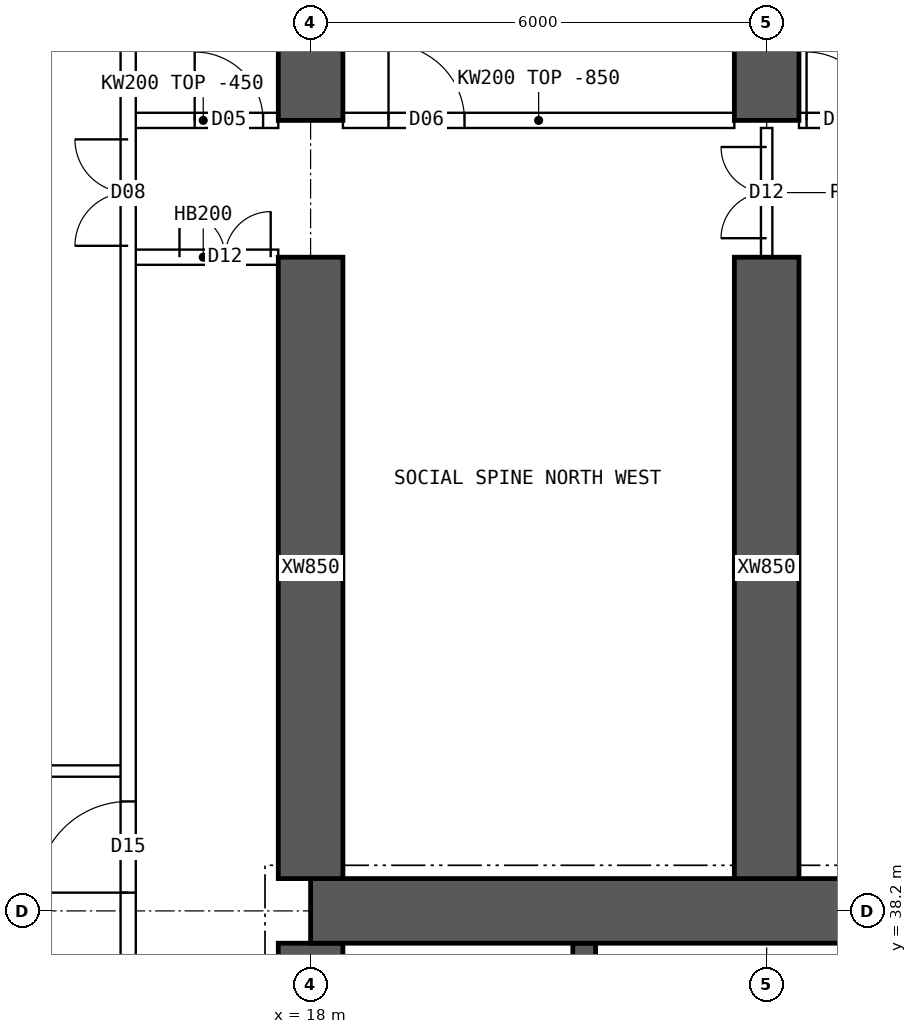
"""IFC4 building model, lengths in metres.
Left out: names, types, materials, properties, quantities, classifications, styles, units other than length and angle.
Written with IfcOpenShell. Run it as: python <this file> out.ifc"""

import sys

from ifc_helpers import new_model, si_unit, direction, frame, frame_2d, origin, place, context, subcontext, project, spatial, polyline, rectangle, outline, extrude, element, fill, save


model = new_model("IFC4")
c1 = context("Model", 3, precision=1e-05, world=origin(), true_north=direction((0.0, 1.0)))
c2 = subcontext(c1, "Body", "Model", "MODEL_VIEW")
j1 = project(units=[si_unit("LENGTHUNIT", "METRE"), si_unit("PLANEANGLEUNIT", "RADIAN")], contexts=[c1])
p1 = place(None, origin())
s1 = spatial("IfcSite", under=j1, at=p1, CompositionType="ELEMENT")
p2 = place(p1, origin())
s2 = spatial("IfcBuilding", under=s1, at=p2, CompositionType="ELEMENT")
p3 = place(p2, frame((0.0, 0.0, 159.85)))
s3 = spatial("IfcBuildingStorey", under=s2, at=p3, CompositionType="ELEMENT", Elevation=159.85)
p4 = place(p3, frame((18.0, 38.2, 0.0), z_axis=(0.0, 0.0, 1.0), x_axis=(1.0, 0.0, 0.0)))
e1 = element("IfcWall", 1, at=p4, inside=s3, PredefinedType="SHEAR", context=c2, shape_type="SweptSolid", body=[
    extrude(rectangle(XDim=48.0, YDim=0.85, at=frame_2d((24.0, 0.0))), origin(), (0.0, 0.0, 1.0), 3.75),
])
p5 = place(p3, frame((18.0, 26.225, 0.0), z_axis=(0.0, 0.0, 1.0), x_axis=(0.0, 1.0, 0.0)))
e2 = element("IfcWall", 2, at=p5, inside=s3, PredefinedType="SHEAR", context=c2, shape_type="SweptSolid", body=[
    extrude(rectangle(XDim=11.55, YDim=0.85, at=frame_2d((5.775, 0.0))), origin(), (0.0, 0.0, 1.0), 3.75),
])
p6 = place(p5, frame((5.075, 0.0, 0.0)))
e3 = element("IfcOpeningElement", 3, at=p6, cuts=e2, PredefinedType="OPENING", context=c2, shape_type="SweptSolid", body=[
    extrude(rectangle(XDim=1.2, YDim=2.1, at=frame_2d((0.6, 1.05))), frame((0.0, 0.435, 0.0), z_axis=(0.0, -1.0, 0.0), x_axis=(1.0, 0.0, 0.0)), (0.0, 0.0, 1.0), 0.87),
])
p7 = place(p3, frame((21.6, 34.75, 0.0), z_axis=(0.0, 0.0, 1.0), x_axis=(0.0, 1.0, 0.0)))
e4 = element("IfcWall", 4, at=p7, inside=s3, PredefinedType="SHEAR", context=c2, shape_type="SweptSolid", body=[
    extrude(rectangle(XDim=3.025, YDim=0.3, at=frame_2d((1.512, 0.0))), origin(), (0.0, 0.0, 1.0), 3.75),
])
p8 = place(p3, frame((18.0, 48.6, 0.0), z_axis=(0.0, 0.0, 1.0), x_axis=(0.0, 1.0, 0.0)))
e5 = element("IfcWall", 5, at=p8, inside=s3, PredefinedType="SHEAR", context=c2, shape_type="SweptSolid", body=[
    extrude(rectangle(XDim=5.4, YDim=0.85, at=frame_2d((2.7, 0.0))), origin(), (0.0, 0.0, 1.0), 3.75),
])
p9 = place(p3, frame((18.0, 38.625, 0.0), z_axis=(0.0, 0.0, 1.0), x_axis=(0.0, 1.0, 0.0)))
e6 = element("IfcWall", 6, at=p9, inside=s3, PredefinedType="SHEAR", context=c2, shape_type="SweptSolid", body=[
    extrude(rectangle(XDim=8.175, YDim=0.85, at=frame_2d((4.087, 0.0))), origin(), (0.0, 0.0, 1.0), 3.75),
])
p10 = place(p3, frame((24.0, 48.6, 0.0), z_axis=(0.0, 0.0, 1.0), x_axis=(0.0, 1.0, 0.0)))
e7 = element("IfcWall", 7, at=p10, inside=s3, PredefinedType="SHEAR", context=c2, shape_type="SweptSolid", body=[
    extrude(rectangle(XDim=5.4, YDim=0.85, at=frame_2d((2.7, 0.0))), origin(), (0.0, 0.0, 1.0), 3.75),
])
p11 = place(p3, frame((24.0, 38.625, 0.0), z_axis=(0.0, 0.0, 1.0), x_axis=(0.0, 1.0, 0.0)))
e8 = element("IfcWall", 8, at=p11, inside=s3, PredefinedType="SHEAR", context=c2, shape_type="SweptSolid", body=[
    extrude(rectangle(XDim=8.175, YDim=0.85, at=frame_2d((4.087, 0.0))), origin(), (0.0, 0.0, 1.0), 3.75),
])
p12 = place(p3, frame((15.6, 48.6, 0.0), z_axis=(0.0, 0.0, 1.0), x_axis=(1.0, 0.0, 0.0)))
e9 = element("IfcWall", 9, at=p12, inside=s3, PredefinedType="SOLIDWALL", context=c2, shape_type="SweptSolid", body=[
    extrude(rectangle(XDim=1.975, YDim=0.2, at=frame_2d((0.987, 0.0))), origin(), (0.0, 0.0, 1.0), 3.3),
])
p13 = place(p12, frame((0.875, 0.0, 0.0)))
e10 = element("IfcOpeningElement", 10, at=p13, cuts=e9, PredefinedType="OPENING", context=c2, shape_type="SweptSolid", body=[
    extrude(rectangle(XDim=0.9, YDim=2.1, at=frame_2d((0.45, 1.05))), frame((0.0, 0.11, 0.0), z_axis=(0.0, -1.0, 0.0), x_axis=(1.0, 0.0, 0.0)), (0.0, 0.0, 1.0), 0.22),
])
p14 = place(p3, frame((15.6, 46.8, 0.0), z_axis=(0.0, 0.0, 1.0), x_axis=(1.0, 0.0, 0.0)))
e11 = element("IfcWall", 11, at=p14, inside=s3, PredefinedType="SOLIDWALL", context=c2, shape_type="SweptSolid", body=[
    extrude(rectangle(XDim=1.975, YDim=0.2, at=frame_2d((0.987, 0.0))), origin(), (0.0, 0.0, 1.0), 3.3),
])
p15 = place(p14, frame((0.675, 0.0, 0.0)))
e12 = element("IfcOpeningElement", 12, at=p15, cuts=e11, PredefinedType="OPENING", context=c2, shape_type="SweptSolid", body=[
    extrude(rectangle(XDim=1.2, YDim=2.1, at=frame_2d((0.6, 1.05))), frame((0.0, 0.11, 0.0), z_axis=(0.0, -1.0, 0.0), x_axis=(1.0, 0.0, 0.0)), (0.0, 0.0, 1.0), 0.22),
])
p16 = place(p3, frame((18.425, 48.6, 0.0), z_axis=(0.0, 0.0, 1.0), x_axis=(1.0, 0.0, 0.0)))
e13 = element("IfcWall", 13, at=p16, inside=s3, PredefinedType="SOLIDWALL", context=c2, shape_type="SweptSolid", body=[
    extrude(outline(polyline([(0.0, 0.0), (5.15, 0.0), (5.15, 2.9), (0.0, 2.9), (0.0, 0.0)])), frame((0.0, 0.1, 0.0), z_axis=(0.0, -1.0, 0.0), x_axis=(1.0, 0.0, 0.0)), (0.0, 0.0, 1.0), 0.2),
])
p17 = place(p16, frame((0.6, 0.0, 0.0)))
e14 = element("IfcOpeningElement", 14, at=p17, cuts=e13, PredefinedType="OPENING", context=c2, shape_type="SweptSolid", body=[
    extrude(rectangle(XDim=1.0, YDim=2.1, at=frame_2d((0.5, 1.05))), frame((0.0, 0.11, 0.0), z_axis=(0.0, -1.0, 0.0), x_axis=(1.0, 0.0, 0.0)), (0.0, 0.0, 1.0), 0.22),
])
p18 = place(p3, frame((24.425, 48.6, 0.0), z_axis=(0.0, 0.0, 1.0), x_axis=(1.0, 0.0, 0.0)))
e15 = element("IfcWall", 15, at=p18, inside=s3, PredefinedType="SOLIDWALL", context=c2, shape_type="SweptSolid", body=[
    extrude(outline(polyline([(0.0, 0.0), (5.15, 0.0), (5.15, 2.9), (0.0, 2.9), (0.0, 0.0)])), frame((0.0, 0.1, 0.0), z_axis=(0.0, -1.0, 0.0), x_axis=(1.0, 0.0, 0.0)), (0.0, 0.0, 1.0), 0.2),
])
p19 = place(p18, frame((0.1, 0.0, 0.0)))
e16 = element("IfcOpeningElement", 16, at=p19, cuts=e15, PredefinedType="OPENING", context=c2, shape_type="SweptSolid", body=[
    extrude(rectangle(XDim=0.9, YDim=2.1, at=frame_2d((0.45, 1.05))), frame((0.0, 0.11, 0.0), z_axis=(0.0, -1.0, 0.0), x_axis=(1.0, 0.0, 0.0)), (0.0, 0.0, 1.0), 0.22),
])
p20 = place(p3, frame((24.0, 46.8, 0.0), z_axis=(0.0, 0.0, 1.0), x_axis=(0.0, 1.0, 0.0)))
e17 = element("IfcWall", 17, at=p20, inside=s3, PredefinedType="PARTITIONING", context=c2, shape_type="SweptSolid", body=[
    extrude(outline(polyline([(0.0, 0.0), (1.7, 0.0), (1.7, 2.9), (0.0, 2.9), (0.0, 0.0)])), frame((0.0, 0.075, 0.0), z_axis=(0.0, -1.0, 0.0), x_axis=(1.0, 0.0, 0.0)), (0.0, 0.0, 1.0), 0.15),
])
p21 = place(p20, frame((0.25, 0.0, 0.0)))
e18 = element("IfcOpeningElement", 18, at=p21, cuts=e17, PredefinedType="OPENING", context=c2, shape_type="SweptSolid", body=[
    extrude(rectangle(XDim=1.2, YDim=2.1, at=frame_2d((0.6, 1.05))), frame((0.0, 0.085, 0.0), z_axis=(0.0, -1.0, 0.0), x_axis=(1.0, 0.0, 0.0)), (0.0, 0.0, 1.0), 0.17),
])
p22 = place(p3, frame((15.6, 10.446, 0.0), z_axis=(0.0, 0.0, 1.0), x_axis=(0.0, 1.0, 0.0)))
e19 = element("IfcWall", 19, at=p22, inside=s3, PredefinedType="SOLIDWALL", context=c2, shape_type="SweptSolid", body=[
    extrude(rectangle(XDim=43.107, YDim=0.2, at=frame_2d((21.554, 0.0))), origin(), (0.0, 0.0, 1.0), 3.3),
])
p23 = place(p22, frame((13.914, 0.0, 0.0)))
e20 = element("IfcOpeningElement", 20, at=p23, cuts=e19, PredefinedType="OPENING", context=c2, shape_type="SweptSolid", body=[
    extrude(rectangle(XDim=1.2, YDim=2.1, at=frame_2d((0.6, 1.05))), frame((0.0, 0.11, 0.0), z_axis=(0.0, -1.0, 0.0), x_axis=(1.0, 0.0, 0.0)), (0.0, 0.0, 1.0), 0.22),
])
p24 = place(p22, frame((27.994, 0.0, 0.0)))
e21 = element("IfcOpeningElement", 21, at=p24, cuts=e19, PredefinedType="OPENING", context=c2, shape_type="SweptSolid", body=[
    extrude(rectangle(XDim=1.2, YDim=2.1, at=frame_2d((0.6, 1.05))), frame((0.0, 0.11, 0.0), z_axis=(0.0, -1.0, 0.0), x_axis=(1.0, 0.0, 0.0)), (0.0, 0.0, 1.0), 0.22),
])
p25 = place(p22, frame((5.104, 0.0, 0.0)))
e22 = element("IfcOpeningElement", 22, at=p25, cuts=e19, PredefinedType="OPENING", context=c2, shape_type="SweptSolid", body=[
    extrude(rectangle(XDim=1.4, YDim=2.1, at=frame_2d((0.7, 1.05))), frame((0.0, 0.11, 0.0), z_axis=(0.0, -1.0, 0.0), x_axis=(1.0, 0.0, 0.0)), (0.0, 0.0, 1.0), 0.22),
])
p26 = place(p22, frame((36.504, 0.0, 0.0)))
e23 = element("IfcOpeningElement", 23, at=p26, cuts=e19, PredefinedType="OPENING", context=c2, shape_type="SweptSolid", body=[
    extrude(rectangle(XDim=1.4, YDim=2.1, at=frame_2d((0.7, 1.05))), frame((0.0, 0.11, 0.0), z_axis=(0.0, -1.0, 0.0), x_axis=(1.0, 0.0, 0.0)), (0.0, 0.0, 1.0), 0.22),
])
p27 = place(p3, frame((8.705, 40.04, 0.0), z_axis=(0.0, 0.0, 1.0), x_axis=(1.0, 0.0, 0.0)))
e24 = element("IfcWall", 24, at=p27, inside=s3, PredefinedType="PARTITIONING", context=c2, shape_type="SweptSolid", body=[
    extrude(rectangle(XDim=6.82, YDim=0.15, at=frame_2d((3.41, 0.0))), origin(), (0.0, 0.0, 1.0), 3.3),
])
p28 = place(p15, origin())
e25 = element("IfcDoor", 25, at=p28, inside=s3, OperationType="DOUBLE_DOOR_SINGLE_SWING", PredefinedType="DOOR", context=c2, shape_type="SweptSolid", body=[
    extrude(rectangle(XDim=1.2, YDim=2.1, at=frame_2d((0.6, 1.05))), frame((0.0, 0.025, 0.0), z_axis=(0.0, -1.0, 0.0), x_axis=(1.0, 0.0, 0.0)), (0.0, 0.0, 1.0), 0.05),
])
fill(e12, e25)
p29 = place(p17, origin())
e26 = element("IfcDoor", 26, at=p29, inside=s3, OperationType="SINGLE_SWING_LEFT", PredefinedType="DOOR", context=c2, shape_type="SweptSolid", body=[
    extrude(rectangle(XDim=1.0, YDim=2.1, at=frame_2d((0.5, 1.05))), frame((0.0, 0.025, 0.0), z_axis=(0.0, -1.0, 0.0), x_axis=(1.0, 0.0, 0.0)), (0.0, 0.0, 1.0), 0.05),
])
fill(e14, e26)
p30 = place(p19, origin())
e27 = element("IfcDoor", 27, at=p30, inside=s3, OperationType="SINGLE_SWING_LEFT", PredefinedType="DOOR", context=c2, shape_type="SweptSolid", body=[
    extrude(rectangle(XDim=0.9, YDim=2.1, at=frame_2d((0.45, 1.05))), frame((0.0, 0.025, 0.0), z_axis=(0.0, -1.0, 0.0), x_axis=(1.0, 0.0, 0.0)), (0.0, 0.0, 1.0), 0.05),
])
fill(e16, e27)
p31 = place(p21, origin())
e28 = element("IfcDoor", 28, at=p31, inside=s3, OperationType="DOUBLE_DOOR_SINGLE_SWING", PredefinedType="DOOR", context=c2, shape_type="SweptSolid", body=[
    extrude(rectangle(XDim=1.2, YDim=2.1, at=frame_2d((0.6, 1.05))), frame((0.0, 0.025, 0.0), z_axis=(0.0, -1.0, 0.0), x_axis=(1.0, 0.0, 0.0)), (0.0, 0.0, 1.0), 0.05),
])
fill(e18, e28)
p32 = place(p24, origin())
e29 = element("IfcDoor", 29, at=p32, inside=s3, OperationType="SINGLE_SWING_LEFT", PredefinedType="DOOR", context=c2, shape_type="SweptSolid", body=[
    extrude(rectangle(XDim=1.2, YDim=2.1, at=frame_2d((0.6, 1.05))), frame((0.0, 0.025, 0.0), z_axis=(0.0, -1.0, 0.0), x_axis=(1.0, 0.0, 0.0)), (0.0, 0.0, 1.0), 0.05),
])
fill(e21, e29)
p33 = place(p26, origin())
e30 = element("IfcDoor", 30, at=p33, inside=s3, OperationType="DOUBLE_DOOR_SINGLE_SWING", PredefinedType="DOOR", context=c2, shape_type="SweptSolid", body=[
    extrude(rectangle(XDim=1.4, YDim=2.1, at=frame_2d((0.7, 1.05))), frame((0.0, 0.025, 0.0), z_axis=(0.0, -1.0, 0.0), x_axis=(1.0, 0.0, 0.0)), (0.0, 0.0, 1.0), 0.05),
])
fill(e23, e30)
p34 = place(p13, origin())
e31 = element("IfcDoor", 31, at=p34, inside=s3, OperationType="SINGLE_SWING_LEFT", PredefinedType="DOOR", context=c2, shape_type="SweptSolid", body=[
    extrude(rectangle(XDim=0.9, YDim=2.1, at=frame_2d((0.45, 1.05))), frame((0.0, 0.025, 0.0), z_axis=(0.0, -1.0, 0.0), x_axis=(1.0, 0.0, 0.0)), (0.0, 0.0, 1.0), 0.05),
])
fill(e10, e31)
save(model, sys.argv[1])
